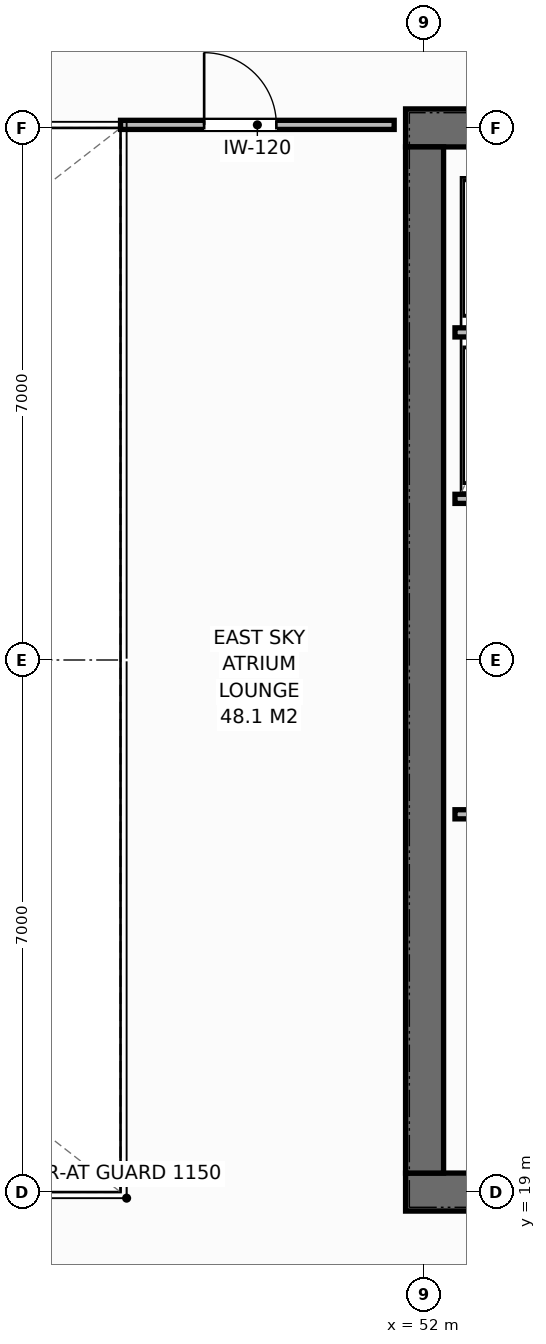
"""IFC4 building model, lengths in metres.
Left out: names, types, materials, properties, quantities, classifications, styles, units other than length and angle.
Written with IfcOpenShell. Run it as: python <this file> out.ifc"""

import sys

from ifc_helpers import new_model, si_unit, direction, frame, frame_2d, origin, place, context, subcontext, project, spatial, rectangle, extrude, element, fill, save


model = new_model("IFC4")
c1 = context("Model", 3, precision=1e-05, world=origin(), true_north=direction((0.0, 1.0)))
c2 = subcontext(c1, "Body", "Model", "MODEL_VIEW")
j1 = project(units=[si_unit("LENGTHUNIT", "METRE"), si_unit("PLANEANGLEUNIT", "RADIAN")], contexts=[c1])
p1 = place(None, origin())
s1 = spatial("IfcSite", under=j1, at=p1, CompositionType="ELEMENT")
p2 = place(p1, origin())
s2 = spatial("IfcBuilding", under=s1, at=p2, CompositionType="ELEMENT")
p3 = place(p2, frame((0.0, 0.0, 306.4)))
s3 = spatial("IfcBuildingStorey", under=s2, at=p3, CompositionType="ELEMENT", Elevation=306.4)
p4 = place(p3, frame((51.75, 19.0, 0.0), z_axis=(0.0, 0.0, 1.0), x_axis=(1.0, 0.0, 0.0)))
e1 = element("IfcWall", 1, at=p4, inside=s3, PredefinedType="SHEAR", context=c2, shape_type="SweptSolid", body=[
    extrude(rectangle(XDim=13.5, YDim=0.5, at=frame_2d((6.75, 0.0))), origin(), (0.0, 0.0, 1.0), 4.0),
])
p5 = place(p4, frame((2.97, 0.0, 0.0)))
e2 = element("IfcOpeningElement", 2, at=p5, cuts=e1, PredefinedType="OPENING", context=c2, shape_type="SweptSolid", body=[
    extrude(rectangle(XDim=1.4, YDim=2.2, at=frame_2d((0.7, 1.1))), frame((0.0, 0.26, 0.0), z_axis=(0.0, -1.0, 0.0), x_axis=(1.0, 0.0, 0.0)), (0.0, 0.0, 1.0), 0.52),
])
p6 = place(p3, frame((51.75, 33.0, 0.0), z_axis=(0.0, 0.0, 1.0), x_axis=(1.0, 0.0, 0.0)))
e3 = element("IfcWall", 3, at=p6, inside=s3, PredefinedType="SHEAR", context=c2, shape_type="SweptSolid", body=[
    extrude(rectangle(XDim=13.5, YDim=0.5, at=frame_2d((6.75, 0.0))), origin(), (0.0, 0.0, 1.0), 4.0),
])
p7 = place(p6, frame((2.97, 0.0, 0.0)))
e4 = element("IfcOpeningElement", 4, at=p7, cuts=e3, PredefinedType="OPENING", context=c2, shape_type="SweptSolid", body=[
    extrude(rectangle(XDim=1.4, YDim=2.2, at=frame_2d((0.7, 1.1))), frame((0.0, 0.26, 0.0), z_axis=(0.0, -1.0, 0.0), x_axis=(1.0, 0.0, 0.0)), (0.0, 0.0, 1.0), 0.52),
])
p8 = place(p6, frame((10.85, 0.0, 0.0)))
e5 = element("IfcOpeningElement", 5, at=p8, cuts=e3, PredefinedType="OPENING", context=c2, shape_type="SweptSolid", body=[
    extrude(rectangle(XDim=0.9, YDim=2.15, at=frame_2d((0.45, 1.075))), frame((0.0, 0.26, 0.0), z_axis=(0.0, -1.0, 0.0), x_axis=(1.0, 0.0, 0.0)), (0.0, 0.0, 1.0), 0.52),
])
p9 = place(p6, frame((5.8, 0.0, 0.0)))
e6 = element("IfcOpeningElement", 6, at=p9, cuts=e3, PredefinedType="OPENING", context=c2, shape_type="SweptSolid", body=[
    extrude(rectangle(XDim=0.9, YDim=2.15, at=frame_2d((0.45, 1.075))), frame((0.0, 0.26, 0.0), z_axis=(0.0, -1.0, 0.0), x_axis=(1.0, 0.0, 0.0)), (0.0, 0.0, 1.0), 0.52),
])
p10 = place(p6, frame((8.2, 0.0, 0.0)))
e7 = element("IfcOpeningElement", 7, at=p10, cuts=e3, PredefinedType="OPENING", context=c2, shape_type="SweptSolid", body=[
    extrude(rectangle(XDim=0.95, YDim=2.15, at=frame_2d((0.475, 1.075))), frame((0.0, 0.26, 0.0), z_axis=(0.0, -1.0, 0.0), x_axis=(1.0, 0.0, 0.0)), (0.0, 0.0, 1.0), 0.52),
])
p11 = place(p3, frame((52.0, 19.25, 0.0), z_axis=(0.0, 0.0, 1.0), x_axis=(0.0, 1.0, 0.0)))
e8 = element("IfcWall", 8, at=p11, inside=s3, PredefinedType="SHEAR", context=c2, shape_type="SweptSolid", body=[
    extrude(rectangle(XDim=13.5, YDim=0.5, at=frame_2d((6.75, 0.0))), origin(), (0.0, 0.0, 1.0), 4.0),
])
for number, where, z_axis, x_axis in (
    (9, (52.4, 23.97, 0.0), (0.0, 0.0, 1.0), (1.0, 0.0, 0.0)),
    (10, (52.4, 28.12, 0.0), (0.0, 0.0, 1.0), (1.0, 0.0, 0.0)),
    (11, (52.4, 30.31, 0.0), (0.0, 0.0, 1.0), (1.0, 0.0, 0.0)),
):
    element("IfcWall", number, at=place(p3, frame(where, z_axis=z_axis, x_axis=x_axis)), inside=s3, PredefinedType="PARTITIONING", context=c2, shape_type="SweptSolid", body=[
        extrude(rectangle(XDim=2.2, YDim=0.12, at=frame_2d((1.1, 0.0))), origin(), (0.0, 0.0, 1.0), 3.72),
    ])
p12 = place(p3, frame((48.0, 33.04, 0.0), z_axis=(0.0, 0.0, 1.0), x_axis=(1.0, 0.0, 0.0)))
e12 = element("IfcWall", 12, at=p12, inside=s3, PredefinedType="PARTITIONING", context=c2, shape_type="SweptSolid", body=[
    extrude(rectangle(XDim=3.6, YDim=0.12, at=frame_2d((1.8, 0.0))), origin(), (0.0, 0.0, 1.0), 3.46),
])
p13 = place(p12, frame((1.1, 0.0, 0.0)))
e13 = element("IfcOpeningElement", 13, at=p13, cuts=e12, PredefinedType="OPENING", context=c2, shape_type="SweptSolid", body=[
    extrude(rectangle(XDim=0.95, YDim=2.15, at=frame_2d((0.475, 1.075))), frame((0.0, 0.07, 0.0), z_axis=(0.0, -1.0, 0.0), x_axis=(1.0, 0.0, 0.0)), (0.0, 0.0, 1.0), 0.14),
])
p14 = place(p13, origin())
e14 = element("IfcDoor", 14, at=p14, inside=s3, OperationType="SINGLE_SWING_LEFT", PredefinedType="DOOR", context=c2, shape_type="SweptSolid", body=[
    extrude(rectangle(XDim=0.95, YDim=2.15, at=frame_2d((0.475, 1.075))), frame((0.0, 0.025, 0.0), z_axis=(0.0, -1.0, 0.0), x_axis=(1.0, 0.0, 0.0)), (0.0, 0.0, 1.0), 0.05),
])
fill(e13, e14)
save(model, sys.argv[1])
